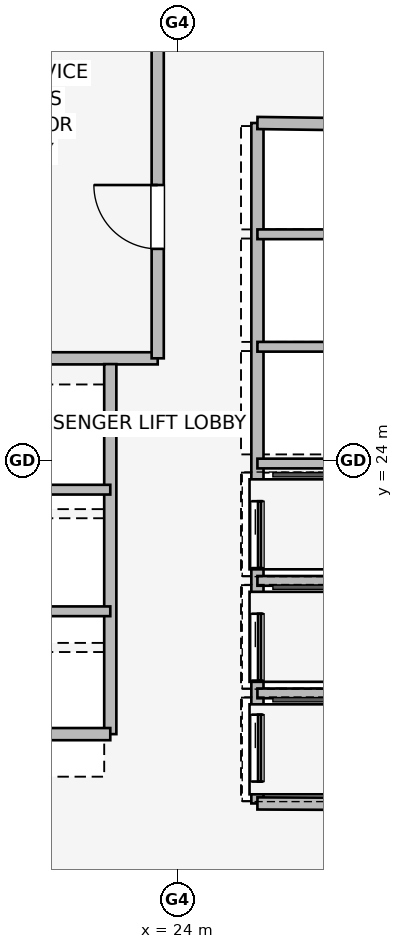
"""IFC4 building model, lengths in metres.
Left out: names, types, materials, properties, quantities, classifications, styles, units other than length and angle.
Written with IfcOpenShell. Run it as: python <this file> out.ifc"""

import sys

from ifc_helpers import new_model, si_unit, direction, frame, frame_2d, origin, place, context, subcontext, project, spatial, rectangle, extrude, element, fill, save


model = new_model("IFC4")
c1 = context("Model", 3, precision=1e-05, world=origin(), true_north=direction((0.0, 1.0)))
c2 = subcontext(c1, "Body", "Model", "MODEL_VIEW")
j1 = project(units=[si_unit("LENGTHUNIT", "METRE"), si_unit("PLANEANGLEUNIT", "RADIAN")], contexts=[c1])
p1 = place(None, origin())
s1 = spatial("IfcSite", under=j1, at=p1, CompositionType="ELEMENT")
p2 = place(p1, origin())
s2 = spatial("IfcBuilding", under=s1, at=p2, CompositionType="ELEMENT")
p3 = place(p2, frame((0.0, 0.0, 81.75)))
s3 = spatial("IfcBuildingStorey", under=s2, at=p3, CompositionType="ELEMENT", Elevation=81.75)
p4 = place(p3, frame((20.793, 25.68, 0.0), z_axis=(0.0, 0.0, 1.0), x_axis=(1.0, 0.0, 0.0)))
e1 = element("IfcWall", 1, at=p4, inside=s3, PredefinedType="PARTITIONING", context=c2, shape_type="SweptSolid", body=[
    extrude(rectangle(XDim=2.887, YDim=0.2, at=frame_2d((1.443, 0.0))), origin(), (0.0, 0.0, 1.0), 3.39),
])
p5 = place(p3, frame((23.68, 25.68, 0.0), z_axis=(0.0, 0.0, 1.0), x_axis=(0.0, 1.0, 0.0)))
e2 = element("IfcWall", 2, at=p5, inside=s3, PredefinedType="PARTITIONING", context=c2, shape_type="SweptSolid", body=[
    extrude(rectangle(XDim=5.54, YDim=0.2, at=frame_2d((2.77, 0.0))), origin(), (0.0, 0.0, 1.0), 3.39),
])
p6 = place(p5, frame((1.8, 0.0, 0.0)))
e3 = element("IfcOpeningElement", 3, at=p6, cuts=e2, PredefinedType="OPENING", context=c2, shape_type="SweptSolid", body=[
    extrude(rectangle(XDim=1.05, YDim=2.0, at=frame_2d((0.525, 1.0))), frame((0.0, 0.11, 0.0), z_axis=(0.0, -1.0, 0.0), x_axis=(1.0, 0.0, 0.0)), (0.0, 0.0, 1.0), 0.22),
])
p7 = place(p3, frame((22.9, 19.5, 0.0), z_axis=(0.0, 0.0, 1.0), x_axis=(0.0, 1.0, 0.0)))
e4 = element("IfcWall", 4, at=p7, inside=s3, PredefinedType="PARTITIONING", context=c2, shape_type="SweptSolid", body=[
    extrude(rectangle(XDim=6.085, YDim=0.2, at=frame_2d((3.042, 0.0))), origin(), (0.0, 0.0, 1.0), 3.39),
])
p8 = place(p3, frame((20.49, 19.5, 0.0), z_axis=(0.0, 0.0, 1.0), x_axis=(1.0, 0.0, 0.0)))
e5 = element("IfcWall", 5, at=p8, inside=s3, PredefinedType="PARTITIONING", context=c2, shape_type="SweptSolid", body=[
    extrude(rectangle(XDim=2.41, YDim=0.2, at=frame_2d((1.205, 0.0))), origin(), (0.0, 0.0, 1.0), 2.29),
])
for number, where, z_axis, x_axis in (
    (6, (20.55, 21.52, 0.0), (0.0, 0.0, 1.0), (1.0, 0.0, 0.0)),
    (7, (20.55, 23.52, 0.0), (0.0, 0.0, 1.0), (1.0, 0.0, 0.0)),
):
    element("IfcWall", number, at=place(p3, frame(where, z_axis=z_axis, x_axis=x_axis)), inside=s3, PredefinedType="PARTITIONING", context=c2, shape_type="SweptSolid", body=[
        extrude(rectangle(XDim=2.35, YDim=0.16, at=frame_2d((1.175, 0.0))), origin(), (0.0, 0.0, 1.0), 3.39),
    ])
p9 = place(p3, frame((25.32, 29.55, 0.0), z_axis=(0.0, 0.0, 1.0), x_axis=(0.0, -1.0, 0.0)))
e8 = element("IfcWall", 8, at=p9, inside=s3, PredefinedType="PARTITIONING", context=c2, shape_type="SweptSolid", body=[
    extrude(rectangle(XDim=11.19, YDim=0.2, at=frame_2d((5.595, 0.0))), origin(), (0.0, 0.0, 1.0), 3.39),
])
p10 = place(p9, frame((6.22, 0.0, 0.0)))
e9 = element("IfcOpeningElement", 9, at=p10, cuts=e8, PredefinedType="OPENING", context=c2, shape_type="SweptSolid", body=[
    extrude(rectangle(XDim=1.1, YDim=2.2, at=frame_2d((0.55, 1.1))), frame((0.0, 0.11, 0.0), z_axis=(0.0, -1.0, 0.0), x_axis=(1.0, 0.0, 0.0)), (0.0, 0.0, 1.0), 0.22),
])
p11 = place(p9, frame((8.07, 0.0, 0.0)))
e10 = element("IfcOpeningElement", 10, at=p11, cuts=e8, PredefinedType="OPENING", context=c2, shape_type="SweptSolid", body=[
    extrude(rectangle(XDim=1.1, YDim=2.2, at=frame_2d((0.55, 1.1))), frame((0.0, 0.11, 0.0), z_axis=(0.0, -1.0, 0.0), x_axis=(1.0, 0.0, 0.0)), (0.0, 0.0, 1.0), 0.22),
])
p12 = place(p9, frame((9.73, 0.0, 0.0)))
e11 = element("IfcOpeningElement", 11, at=p12, cuts=e8, PredefinedType="OPENING", context=c2, shape_type="SweptSolid", body=[
    extrude(rectangle(XDim=1.1, YDim=2.2, at=frame_2d((0.55, 1.1))), frame((0.0, 0.11, 0.0), z_axis=(0.0, -1.0, 0.0), x_axis=(1.0, 0.0, 0.0)), (0.0, 0.0, 1.0), 0.22),
])
p13 = place(p3, frame((25.32, 18.36, 0.0), z_axis=(0.0, 0.0, 1.0), x_axis=(0.999989925833, -0.004488678231, 0.0)))
e12 = element("IfcWall", 12, at=p13, inside=s3, PredefinedType="PARTITIONING", context=c2, shape_type="SweptSolid", body=[
    extrude(rectangle(XDim=2.23, YDim=0.2, at=frame_2d((1.115, 0.0))), origin(), (0.0, 0.0, 1.0), 3.39),
])
p14 = place(p3, frame((27.55, 29.52, 0.0), z_axis=(0.0, 0.0, 1.0), x_axis=(-0.999909343457, 0.013464949556, 0.0)))
e13 = element("IfcWall", 13, at=p14, inside=s3, PredefinedType="PARTITIONING", context=c2, shape_type="SweptSolid", body=[
    extrude(rectangle(XDim=2.23, YDim=0.2, at=frame_2d((1.115, 0.0))), origin(), (0.0, 0.0, 1.0), 2.29),
])
for number, where, z_axis, x_axis in (
    (14, (25.32, 20.17, 0.0), (0.0, 0.0, 1.0), (1.0, 0.0, 0.0)),
    (15, (25.32, 22.02, 0.0), (0.0, 0.0, 1.0), (1.0, 0.0, 0.0)),
    (16, (25.32, 23.95, 0.0), (0.0, 0.0, 1.0), (1.0, 0.0, 0.0)),
    (17, (25.32, 25.87, 0.0), (0.0, 0.0, 1.0), (1.0, 0.0, 0.0)),
    (18, (25.32, 27.72, 0.0), (0.0, 0.0, 1.0), (1.0, 0.0, 0.0)),
):
    element("IfcWall", number, at=place(p3, frame(where, z_axis=z_axis, x_axis=x_axis)), inside=s3, PredefinedType="PARTITIONING", context=c2, shape_type="SweptSolid", body=[
        extrude(rectangle(XDim=2.03, YDim=0.16, at=frame_2d((1.015, 0.0))), origin(), (0.0, 0.0, 1.0), 3.39),
    ])
p15 = place(p6, origin())
e19 = element("IfcDoor", 19, at=p15, inside=s3, OperationType="SINGLE_SWING_RIGHT", PredefinedType="DOOR", context=c2, shape_type="SweptSolid", body=[
    extrude(rectangle(XDim=1.05, YDim=2.0, at=frame_2d((0.525, 1.0))), frame((0.0, 0.025, 0.0), z_axis=(0.0, -1.0, 0.0), x_axis=(1.0, 0.0, 0.0)), (0.0, 0.0, 1.0), 0.05),
])
fill(e3, e19)
p16 = place(p10, origin())
e20 = element("IfcDoor", 20, at=p16, inside=s3, OperationType="SLIDING_TO_LEFT", PredefinedType="DOOR", context=c2, shape_type="SweptSolid", body=[
    extrude(rectangle(XDim=1.1, YDim=2.2, at=frame_2d((0.55, 1.1))), frame((0.0, 0.025, 0.0), z_axis=(0.0, -1.0, 0.0), x_axis=(1.0, 0.0, 0.0)), (0.0, 0.0, 1.0), 0.05),
])
fill(e9, e20)
p17 = place(p11, origin())
e21 = element("IfcDoor", 21, at=p17, inside=s3, OperationType="SLIDING_TO_LEFT", PredefinedType="DOOR", context=c2, shape_type="SweptSolid", body=[
    extrude(rectangle(XDim=1.1, YDim=2.2, at=frame_2d((0.55, 1.1))), frame((0.0, 0.025, 0.0), z_axis=(0.0, -1.0, 0.0), x_axis=(1.0, 0.0, 0.0)), (0.0, 0.0, 1.0), 0.05),
])
fill(e10, e21)
p18 = place(p12, origin())
e22 = element("IfcDoor", 22, at=p18, inside=s3, OperationType="SLIDING_TO_LEFT", PredefinedType="DOOR", context=c2, shape_type="SweptSolid", body=[
    extrude(rectangle(XDim=1.1, YDim=2.2, at=frame_2d((0.55, 1.1))), frame((0.0, 0.025, 0.0), z_axis=(0.0, -1.0, 0.0), x_axis=(1.0, 0.0, 0.0)), (0.0, 0.0, 1.0), 0.05),
])
fill(e11, e22)
save(model, sys.argv[1])
